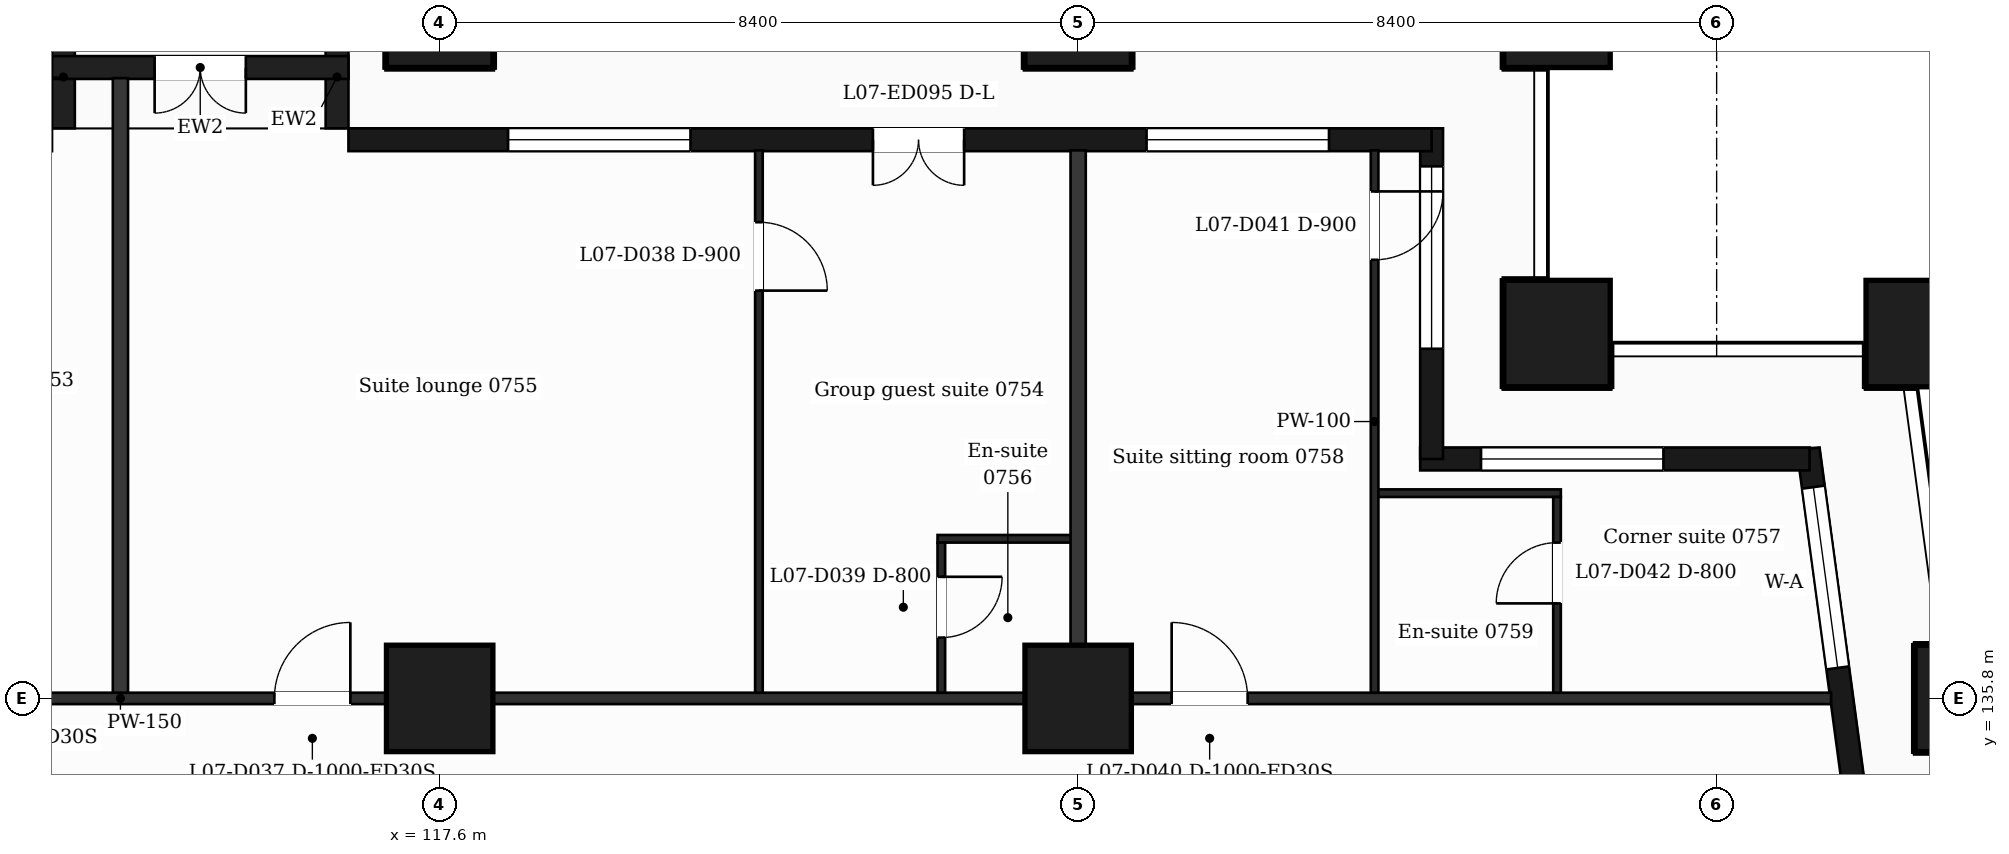
"""IFC4 building model, lengths in metres.
Left out: names, types, materials, properties, quantities, classifications, styles, units other than length and angle.
Written with IfcOpenShell. Run it as: python <this file> out.ifc"""

import sys

from ifc_helpers import new_model, si_unit, direction, frame, frame_2d, origin, origin_2d, place, context, subcontext, project, spatial, rectangle, extrude, element, fill, save


model = new_model("IFC4")
c1 = context("Model", 3, precision=1e-05, world=origin(), true_north=direction((0.0, 1.0)))
c2 = subcontext(c1, "Body", "Model", "MODEL_VIEW")
j1 = project(units=[si_unit("LENGTHUNIT", "METRE"), si_unit("PLANEANGLEUNIT", "RADIAN")], contexts=[c1])
p1 = place(None, origin())
s1 = spatial("IfcSite", under=j1, at=p1, CompositionType="ELEMENT")
p2 = place(p1, origin())
s2 = spatial("IfcBuilding", under=s1, at=p2, CompositionType="ELEMENT")
p3 = place(p2, frame((0.0, 0.0, 42.5)))
s3 = spatial("IfcBuildingStorey", under=s2, at=p3, CompositionType="ELEMENT", Elevation=42.5)
for number, where, z_axis, x_axis in (
    (1, (132.3, 140.6, 0.0), (0.0, 0.0, 1.0), (1.0, 0.0, 0.0)),
    (2, (137.065, 140.6, 0.0), (0.0, 0.0, 1.0), (1.0, 0.0, 0.0)),
    (3, (117.6, 135.8, 0.0), (0.0, 0.0, 1.0), (1.0, 0.0, 0.0)),
    (4, (126.0, 135.8, 0.0), (0.0, 0.0, 1.0), (1.0, 0.0, 0.0)),
    (5, (137.711, 135.8, 0.0), (0.0, 0.0, 1.0), (1.0, 0.0, 0.0)),
    (6, (117.6, 144.8, 0.0), (0.0, 0.0, 1.0), (1.0, 0.0, 0.0)),
    (7, (126.0, 144.8, 0.0), (0.0, 0.0, 1.0), (1.0, 0.0, 0.0)),
    (8, (132.3, 144.8, 0.0), (0.0, 0.0, 1.0), (1.0, 0.0, 0.0)),
):
    element("IfcColumn", number, at=place(p3, frame(where, z_axis=z_axis, x_axis=x_axis)), inside=s3, PredefinedType="COLUMN", context=c2, shape_type="SweptSolid", body=[
        extrude(rectangle(XDim=1.4, YDim=1.4, at=origin_2d()), origin(), (0.0, 0.0, 1.0), 3.5),
    ])
p4 = place(p3, frame((136.504, 132.4, 0.0), z_axis=(0.0, 0.0, 1.0), x_axis=(-0.133399697462, 0.99106231929, 0.0)))
e9 = element("IfcWall", 9, at=p4, inside=s3, PredefinedType="SOLIDWALL", context=c2, shape_type="SweptSolid", body=[
    extrude(rectangle(XDim=6.74, YDim=0.3, at=frame_2d((3.37, 0.0))), origin(), (0.0, 0.0, 1.0), 3.18),
])
p5 = place(p4, frame((1.115, 0.0, 0.0)))
e10 = element("IfcOpeningElement", 10, at=p5, cuts=e9, PredefinedType="OPENING", context=c2, shape_type="SweptSolid", body=[
    extrude(rectangle(XDim=1.2, YDim=2.4, at=frame_2d((0.6, 1.2))), frame((0.0, 0.16, 0.0), z_axis=(0.0, -1.0, 0.0), x_axis=(1.0, 0.0, 0.0)), (0.0, 0.0, 1.0), 0.32),
])
p6 = place(p4, frame((3.835, 0.0, 0.9)))
e11 = element("IfcOpeningElement", 11, at=p6, cuts=e9, PredefinedType="OPENING", context=c2, shape_type="SweptSolid", body=[
    extrude(rectangle(XDim=2.4, YDim=2.1, at=frame_2d((1.2, 1.05))), frame((0.0, 0.16, 0.0), z_axis=(0.0, -1.0, 0.0), x_axis=(1.0, 0.0, 0.0)), (0.0, 0.0, 1.0), 0.32),
])
p7 = place(p3, frame((135.623, 138.95, 0.0), z_axis=(0.0, 0.0, 1.0), x_axis=(-1.0, 0.0, 0.0)))
e12 = element("IfcWall", 12, at=p7, inside=s3, PredefinedType="SOLIDWALL", context=c2, shape_type="SweptSolid", body=[
    extrude(rectangle(XDim=5.123, YDim=0.3, at=frame_2d((2.561, 0.0))), origin(), (0.0, 0.0, 1.0), 3.18),
])
p8 = place(p7, frame((1.923, 0.0, 0.9)))
e13 = element("IfcOpeningElement", 13, at=p8, cuts=e12, PredefinedType="OPENING", context=c2, shape_type="SweptSolid", body=[
    extrude(rectangle(XDim=2.4, YDim=2.1, at=frame_2d((1.2, 1.05))), frame((0.0, 0.16, 0.0), z_axis=(0.0, -1.0, 0.0), x_axis=(1.0, 0.0, 0.0)), (0.0, 0.0, 1.0), 0.32),
])
p9 = place(p3, frame((130.65, 138.95, 0.0), z_axis=(0.0, 0.0, 1.0), x_axis=(0.0, 1.0, 0.0)))
e14 = element("IfcWall", 14, at=p9, inside=s3, PredefinedType="SOLIDWALL", context=c2, shape_type="SweptSolid", body=[
    extrude(rectangle(XDim=4.35, YDim=0.3, at=frame_2d((2.175, 0.0))), origin(), (0.0, 0.0, 1.0), 3.18),
])
p10 = place(p9, frame((1.45, 0.0, 0.9)))
e15 = element("IfcOpeningElement", 15, at=p10, cuts=e14, PredefinedType="OPENING", context=c2, shape_type="SweptSolid", body=[
    extrude(rectangle(XDim=2.4, YDim=2.1, at=frame_2d((1.2, 1.05))), frame((0.0, 0.16, 0.0), z_axis=(0.0, -1.0, 0.0), x_axis=(1.0, 0.0, 0.0)), (0.0, 0.0, 1.0), 0.32),
])
p11 = place(p3, frame((130.65, 143.15, 0.0), z_axis=(0.0, 0.0, 1.0), x_axis=(-1.0, 0.0, 0.0)))
e16 = element("IfcWall", 16, at=p11, inside=s3, PredefinedType="SOLIDWALL", context=c2, shape_type="SweptSolid", body=[
    extrude(rectangle(XDim=14.25, YDim=0.3, at=frame_2d((7.125, 0.0))), origin(), (0.0, 0.0, 1.0), 3.18),
])
p12 = place(p11, frame((1.35, 0.0, 0.9)))
e17 = element("IfcOpeningElement", 17, at=p12, cuts=e16, PredefinedType="OPENING", context=c2, shape_type="SweptSolid", body=[
    extrude(rectangle(XDim=2.4, YDim=2.1, at=frame_2d((1.2, 1.05))), frame((0.0, 0.16, 0.0), z_axis=(0.0, -1.0, 0.0), x_axis=(1.0, 0.0, 0.0)), (0.0, 0.0, 1.0), 0.32),
])
p13 = place(p11, frame((6.15, 0.0, 0.0)))
e18 = element("IfcOpeningElement", 18, at=p13, cuts=e16, PredefinedType="OPENING", context=c2, shape_type="SweptSolid", body=[
    extrude(rectangle(XDim=1.2, YDim=2.4, at=frame_2d((0.6, 1.2))), frame((0.0, 0.16, 0.0), z_axis=(0.0, -1.0, 0.0), x_axis=(1.0, 0.0, 0.0)), (0.0, 0.0, 1.0), 0.32),
])
p14 = place(p11, frame((9.75, 0.0, 0.9)))
e19 = element("IfcOpeningElement", 19, at=p14, cuts=e16, PredefinedType="OPENING", context=c2, shape_type="SweptSolid", body=[
    extrude(rectangle(XDim=2.4, YDim=2.1, at=frame_2d((1.2, 1.05))), frame((0.0, 0.16, 0.0), z_axis=(0.0, -1.0, 0.0), x_axis=(1.0, 0.0, 0.0)), (0.0, 0.0, 1.0), 0.32),
])
for number, where, z_axis, x_axis in (
    (20, (116.25, 143.3, 0.0), (0.0, 0.0, 1.0), (0.0, 1.0, 0.0)),
    (21, (112.65, 143.3, 0.0), (0.0, 0.0, 1.0), (0.0, 1.0, 0.0)),
):
    element("IfcWall", number, at=place(p3, frame(where, z_axis=z_axis, x_axis=x_axis)), inside=s3, PredefinedType="SOLIDWALL", context=c2, shape_type="SweptSolid", body=[
        extrude(rectangle(XDim=1.35, YDim=0.3, at=frame_2d((0.675, 0.0))), origin(), (0.0, 0.0, 1.0), 3.18),
    ])
p15 = place(p3, frame((116.4, 144.1, 0.0), z_axis=(0.0, 0.0, 1.0), x_axis=(-1.0, 0.0, 0.0)))
e22 = element("IfcWall", 22, at=p15, inside=s3, PredefinedType="SOLIDWALL", context=c2, shape_type="SweptSolid", body=[
    extrude(rectangle(XDim=3.9, YDim=0.3, at=frame_2d((1.95, 0.0))), origin(), (0.0, 0.0, 1.0), 3.18),
])
p16 = place(p15, frame((1.35, 0.0, 0.0)))
e23 = element("IfcOpeningElement", 23, at=p16, cuts=e22, PredefinedType="OPENING", context=c2, shape_type="SweptSolid", body=[
    extrude(rectangle(XDim=1.2, YDim=2.4, at=frame_2d((0.6, 1.2))), frame((0.0, 0.16, 0.0), z_axis=(0.0, -1.0, 0.0), x_axis=(1.0, 0.0, 0.0)), (0.0, 0.0, 1.0), 0.32),
])
p17 = place(p3, frame((90.895, 135.8, 0.0), z_axis=(0.0, 0.0, 1.0), x_axis=(1.0, 0.0, 0.0)))
e24 = element("IfcWall", 24, at=p17, inside=s3, PredefinedType="PARTITIONING", context=c2, shape_type="SweptSolid", body=[
    extrude(rectangle(XDim=45.011, YDim=0.15, at=frame_2d((22.505, 0.0))), origin(), (0.0, 0.0, 1.0), 3.18),
])
p18 = place(p17, frame((7.235, 0.0, 0.0)))
e25 = element("IfcOpeningElement", 25, at=p18, cuts=e24, PredefinedType="OPENING", context=c2, shape_type="SweptSolid", body=[
    extrude(rectangle(XDim=1.0, YDim=2.1, at=frame_2d((0.5, 1.05))), frame((0.0, 0.085, 0.0), z_axis=(0.0, -1.0, 0.0), x_axis=(1.0, 0.0, 0.0)), (0.0, 0.0, 1.0), 0.17),
])
p19 = place(p17, frame((12.73, 0.0, 0.0)))
e26 = element("IfcOpeningElement", 26, at=p19, cuts=e24, PredefinedType="OPENING", context=c2, shape_type="SweptSolid", body=[
    extrude(rectangle(XDim=0.95, YDim=2.1, at=frame_2d((0.475, 1.05))), frame((0.0, 0.085, 0.0), z_axis=(0.0, -1.0, 0.0), x_axis=(1.0, 0.0, 0.0)), (0.0, 0.0, 1.0), 0.17),
])
p20 = place(p17, frame((20.185, 0.0, 0.0)))
e27 = element("IfcOpeningElement", 27, at=p20, cuts=e24, PredefinedType="OPENING", context=c2, shape_type="SweptSolid", body=[
    extrude(rectangle(XDim=0.95, YDim=2.1, at=frame_2d((0.475, 1.05))), frame((0.0, 0.085, 0.0), z_axis=(0.0, -1.0, 0.0), x_axis=(1.0, 0.0, 0.0)), (0.0, 0.0, 1.0), 0.17),
])
p21 = place(p17, frame((24.531, 0.0, 0.0)))
e28 = element("IfcOpeningElement", 28, at=p21, cuts=e24, PredefinedType="OPENING", context=c2, shape_type="SweptSolid", body=[
    extrude(rectangle(XDim=1.0, YDim=2.1, at=frame_2d((0.5, 1.05))), frame((0.0, 0.085, 0.0), z_axis=(0.0, -1.0, 0.0), x_axis=(1.0, 0.0, 0.0)), (0.0, 0.0, 1.0), 0.17),
])
p22 = place(p17, frame((36.335, 0.0, 0.0)))
e29 = element("IfcOpeningElement", 29, at=p22, cuts=e24, PredefinedType="OPENING", context=c2, shape_type="SweptSolid", body=[
    extrude(rectangle(XDim=1.0, YDim=2.1, at=frame_2d((0.5, 1.05))), frame((0.0, 0.085, 0.0), z_axis=(0.0, -1.0, 0.0), x_axis=(1.0, 0.0, 0.0)), (0.0, 0.0, 1.0), 0.17),
])
p23 = place(p3, frame((124.15, 137.9, 0.0), z_axis=(0.0, 0.0, 1.0), x_axis=(1.0, 0.0, 0.0)))
e30 = element("IfcWall", 30, at=p23, inside=s3, PredefinedType="PARTITIONING", context=c2, shape_type="SweptSolid", body=[
    extrude(rectangle(XDim=1.85, YDim=0.1, at=frame_2d((0.925, 0.0))), origin(), (0.0, 0.0, 1.0), 3.18),
])
p24 = place(p3, frame((129.9, 138.5, 0.0), z_axis=(0.0, 0.0, 1.0), x_axis=(1.0, 0.0, 0.0)))
e31 = element("IfcWall", 31, at=p24, inside=s3, PredefinedType="PARTITIONING", context=c2, shape_type="SweptSolid", body=[
    extrude(rectangle(XDim=2.45, YDim=0.1, at=frame_2d((1.225, 0.0))), origin(), (0.0, 0.0, 1.0), 3.18),
])
p25 = place(p3, frame((113.4, 135.875, 0.0), z_axis=(0.0, 0.0, 1.0), x_axis=(0.0, 1.0, 0.0)))
e32 = element("IfcWall", 32, at=p25, inside=s3, PredefinedType="PARTITIONING", context=c2, shape_type="SweptSolid", body=[
    extrude(rectangle(XDim=8.085, YDim=0.2, at=frame_2d((4.042, 0.0))), origin(), (0.0, 0.0, 1.0), 3.18),
])
p26 = place(p3, frame((121.8, 135.875, 0.0), z_axis=(0.0, 0.0, 1.0), x_axis=(0.0, 1.0, 0.0)))
e33 = element("IfcWall", 33, at=p26, inside=s3, PredefinedType="PARTITIONING", context=c2, shape_type="SweptSolid", body=[
    extrude(rectangle(XDim=7.135, YDim=0.1, at=frame_2d((3.567, 0.0))), origin(), (0.0, 0.0, 1.0), 3.18),
])
p27 = place(p26, frame((5.29, 0.0, 0.0)))
e34 = element("IfcOpeningElement", 34, at=p27, cuts=e33, PredefinedType="OPENING", context=c2, shape_type="SweptSolid", body=[
    extrude(rectangle(XDim=0.9, YDim=2.1, at=frame_2d((0.45, 1.05))), frame((0.0, 0.06, 0.0), z_axis=(0.0, -1.0, 0.0), x_axis=(1.0, 0.0, 0.0)), (0.0, 0.0, 1.0), 0.12),
])
p28 = place(p3, frame((124.2, 135.875, 0.0), z_axis=(0.0, 0.0, 1.0), x_axis=(0.0, 1.0, 0.0)))
e35 = element("IfcWall", 35, at=p28, inside=s3, PredefinedType="PARTITIONING", context=c2, shape_type="SweptSolid", body=[
    extrude(rectangle(XDim=1.975, YDim=0.1, at=frame_2d((0.988, 0.0))), origin(), (0.0, 0.0, 1.0), 3.18),
])
p29 = place(p28, frame((0.725, 0.0, 0.0)))
e36 = element("IfcOpeningElement", 36, at=p29, cuts=e35, PredefinedType="OPENING", context=c2, shape_type="SweptSolid", body=[
    extrude(rectangle(XDim=0.8, YDim=2.1, at=frame_2d((0.4, 1.05))), frame((0.0, 0.06, 0.0), z_axis=(0.0, -1.0, 0.0), x_axis=(1.0, 0.0, 0.0)), (0.0, 0.0, 1.0), 0.12),
])
p30 = place(p3, frame((126.0, 135.875, 0.0), z_axis=(0.0, 0.0, 1.0), x_axis=(0.0, 1.0, 0.0)))
e37 = element("IfcWall", 37, at=p30, inside=s3, PredefinedType="PARTITIONING", context=c2, shape_type="SweptSolid", body=[
    extrude(rectangle(XDim=7.135, YDim=0.2, at=frame_2d((3.567, 0.0))), origin(), (0.0, 0.0, 1.0), 3.18),
])
p31 = place(p3, frame((129.9, 135.875, 0.0), z_axis=(0.0, 0.0, 1.0), x_axis=(0.0, 1.0, 0.0)))
e38 = element("IfcWall", 38, at=p31, inside=s3, PredefinedType="PARTITIONING", context=c2, shape_type="SweptSolid", body=[
    extrude(rectangle(XDim=7.135, YDim=0.1, at=frame_2d((3.567, 0.0))), origin(), (0.0, 0.0, 1.0), 3.18),
])
p32 = place(p31, frame((5.695, 0.0, 0.0)))
e39 = element("IfcOpeningElement", 39, at=p32, cuts=e38, PredefinedType="OPENING", context=c2, shape_type="SweptSolid", body=[
    extrude(rectangle(XDim=0.9, YDim=2.1, at=frame_2d((0.45, 1.05))), frame((0.0, 0.06, 0.0), z_axis=(0.0, -1.0, 0.0), x_axis=(1.0, 0.0, 0.0)), (0.0, 0.0, 1.0), 0.12),
])
p33 = place(p3, frame((132.3, 135.875, 0.0), z_axis=(0.0, 0.0, 1.0), x_axis=(0.0, 1.0, 0.0)))
e40 = element("IfcWall", 40, at=p33, inside=s3, PredefinedType="PARTITIONING", context=c2, shape_type="SweptSolid", body=[
    extrude(rectangle(XDim=2.575, YDim=0.1, at=frame_2d((1.288, 0.0))), origin(), (0.0, 0.0, 1.0), 3.18),
])
p34 = place(p33, frame((1.175, 0.0, 0.0)))
e41 = element("IfcOpeningElement", 41, at=p34, cuts=e40, PredefinedType="OPENING", context=c2, shape_type="SweptSolid", body=[
    extrude(rectangle(XDim=0.8, YDim=2.1, at=frame_2d((0.4, 1.05))), frame((0.0, 0.06, 0.0), z_axis=(0.0, -1.0, 0.0), x_axis=(1.0, 0.0, 0.0)), (0.0, 0.0, 1.0), 0.12),
])
p35 = place(p6, origin())
e42 = element("IfcWindow", 42, at=p35, inside=s3, PartitioningType="SINGLE_PANEL", PredefinedType="WINDOW", context=c2, shape_type="SweptSolid", body=[
    extrude(rectangle(XDim=2.4, YDim=2.1, at=frame_2d((1.2, 1.05))), frame((0.0, 0.03, 0.0), z_axis=(0.0, -1.0, 0.0), x_axis=(1.0, 0.0, 0.0)), (0.0, 0.0, 1.0), 0.06),
])
fill(e11, e42)
p36 = place(p8, origin())
e43 = element("IfcWindow", 43, at=p36, inside=s3, PartitioningType="SINGLE_PANEL", PredefinedType="WINDOW", context=c2, shape_type="SweptSolid", body=[
    extrude(rectangle(XDim=2.4, YDim=2.1, at=frame_2d((1.2, 1.05))), frame((0.0, 0.03, 0.0), z_axis=(0.0, -1.0, 0.0), x_axis=(1.0, 0.0, 0.0)), (0.0, 0.0, 1.0), 0.06),
])
fill(e13, e43)
p37 = place(p10, origin())
e44 = element("IfcWindow", 44, at=p37, inside=s3, PartitioningType="SINGLE_PANEL", PredefinedType="WINDOW", context=c2, shape_type="SweptSolid", body=[
    extrude(rectangle(XDim=2.4, YDim=2.1, at=frame_2d((1.2, 1.05))), frame((0.0, 0.03, 0.0), z_axis=(0.0, -1.0, 0.0), x_axis=(1.0, 0.0, 0.0)), (0.0, 0.0, 1.0), 0.06),
])
fill(e15, e44)
p38 = place(p12, origin())
e45 = element("IfcWindow", 45, at=p38, inside=s3, PartitioningType="SINGLE_PANEL", PredefinedType="WINDOW", context=c2, shape_type="SweptSolid", body=[
    extrude(rectangle(XDim=2.4, YDim=2.1, at=frame_2d((1.2, 1.05))), frame((0.0, 0.03, 0.0), z_axis=(0.0, -1.0, 0.0), x_axis=(1.0, 0.0, 0.0)), (0.0, 0.0, 1.0), 0.06),
])
fill(e17, e45)
p39 = place(p13, origin())
e46 = element("IfcDoor", 46, at=p39, inside=s3, OperationType="DOUBLE_DOOR_SINGLE_SWING", PredefinedType="DOOR", context=c2, shape_type="SweptSolid", body=[
    extrude(rectangle(XDim=1.2, YDim=2.4, at=frame_2d((0.6, 1.2))), frame((0.0, 0.025, 0.0), z_axis=(0.0, -1.0, 0.0), x_axis=(1.0, 0.0, 0.0)), (0.0, 0.0, 1.0), 0.05),
])
fill(e18, e46)
p40 = place(p14, origin())
e47 = element("IfcWindow", 47, at=p40, inside=s3, PartitioningType="SINGLE_PANEL", PredefinedType="WINDOW", context=c2, shape_type="SweptSolid", body=[
    extrude(rectangle(XDim=2.4, YDim=2.1, at=frame_2d((1.2, 1.05))), frame((0.0, 0.03, 0.0), z_axis=(0.0, -1.0, 0.0), x_axis=(1.0, 0.0, 0.0)), (0.0, 0.0, 1.0), 0.06),
])
fill(e19, e47)
p41 = place(p16, origin())
e48 = element("IfcDoor", 48, at=p41, inside=s3, OperationType="DOUBLE_DOOR_SINGLE_SWING", PredefinedType="DOOR", context=c2, shape_type="SweptSolid", body=[
    extrude(rectangle(XDim=1.2, YDim=2.4, at=frame_2d((0.6, 1.2))), frame((0.0, 0.025, 0.0), z_axis=(0.0, -1.0, 0.0), x_axis=(1.0, 0.0, 0.0)), (0.0, 0.0, 1.0), 0.05),
])
fill(e23, e48)
p42 = place(p21, origin())
e49 = element("IfcDoor", 49, at=p42, inside=s3, OperationType="SINGLE_SWING_RIGHT", PredefinedType="DOOR", context=c2, shape_type="SweptSolid", body=[
    extrude(rectangle(XDim=1.0, YDim=2.1, at=frame_2d((0.5, 1.05))), frame((0.0, 0.025, 0.0), z_axis=(0.0, -1.0, 0.0), x_axis=(1.0, 0.0, 0.0)), (0.0, 0.0, 1.0), 0.05),
])
fill(e28, e49)
p43 = place(p27, origin())
e50 = element("IfcDoor", 50, at=p43, inside=s3, OperationType="SINGLE_SWING_LEFT", PredefinedType="DOOR", context=c2, shape_type="SweptSolid", body=[
    extrude(rectangle(XDim=0.9, YDim=2.1, at=frame_2d((0.45, 1.05))), frame((0.0, 0.025, 0.0), z_axis=(0.0, -1.0, 0.0), x_axis=(1.0, 0.0, 0.0)), (0.0, 0.0, 1.0), 0.05),
])
fill(e34, e50)
p44 = place(p29, origin())
e51 = element("IfcDoor", 51, at=p44, inside=s3, OperationType="SINGLE_SWING_RIGHT", PredefinedType="DOOR", context=c2, shape_type="SweptSolid", body=[
    extrude(rectangle(XDim=0.8, YDim=2.1, at=frame_2d((0.4, 1.05))), frame((0.0, 0.025, 0.0), z_axis=(0.0, -1.0, 0.0), x_axis=(1.0, 0.0, 0.0)), (0.0, 0.0, 1.0), 0.05),
])
fill(e36, e51)
p45 = place(p22, origin())
e52 = element("IfcDoor", 52, at=p45, inside=s3, OperationType="SINGLE_SWING_LEFT", PredefinedType="DOOR", context=c2, shape_type="SweptSolid", body=[
    extrude(rectangle(XDim=1.0, YDim=2.1, at=frame_2d((0.5, 1.05))), frame((0.0, 0.025, 0.0), z_axis=(0.0, -1.0, 0.0), x_axis=(1.0, 0.0, 0.0)), (0.0, 0.0, 1.0), 0.05),
])
fill(e29, e52)
p46 = place(p32, origin())
e53 = element("IfcDoor", 53, at=p46, inside=s3, OperationType="SINGLE_SWING_RIGHT", PredefinedType="DOOR", context=c2, shape_type="SweptSolid", body=[
    extrude(rectangle(XDim=0.9, YDim=2.1, at=frame_2d((0.45, 1.05))), frame((0.0, 0.025, 0.0), z_axis=(0.0, -1.0, 0.0), x_axis=(1.0, 0.0, 0.0)), (0.0, 0.0, 1.0), 0.05),
])
fill(e39, e53)
p47 = place(p34, origin())
e54 = element("IfcDoor", 54, at=p47, inside=s3, OperationType="SINGLE_SWING_LEFT", PredefinedType="DOOR", context=c2, shape_type="SweptSolid", body=[
    extrude(rectangle(XDim=0.8, YDim=2.1, at=frame_2d((0.4, 1.05))), frame((0.0, 0.025, 0.0), z_axis=(0.0, -1.0, 0.0), x_axis=(1.0, 0.0, 0.0)), (0.0, 0.0, 1.0), 0.05),
])
fill(e41, e54)
save(model, sys.argv[1])
